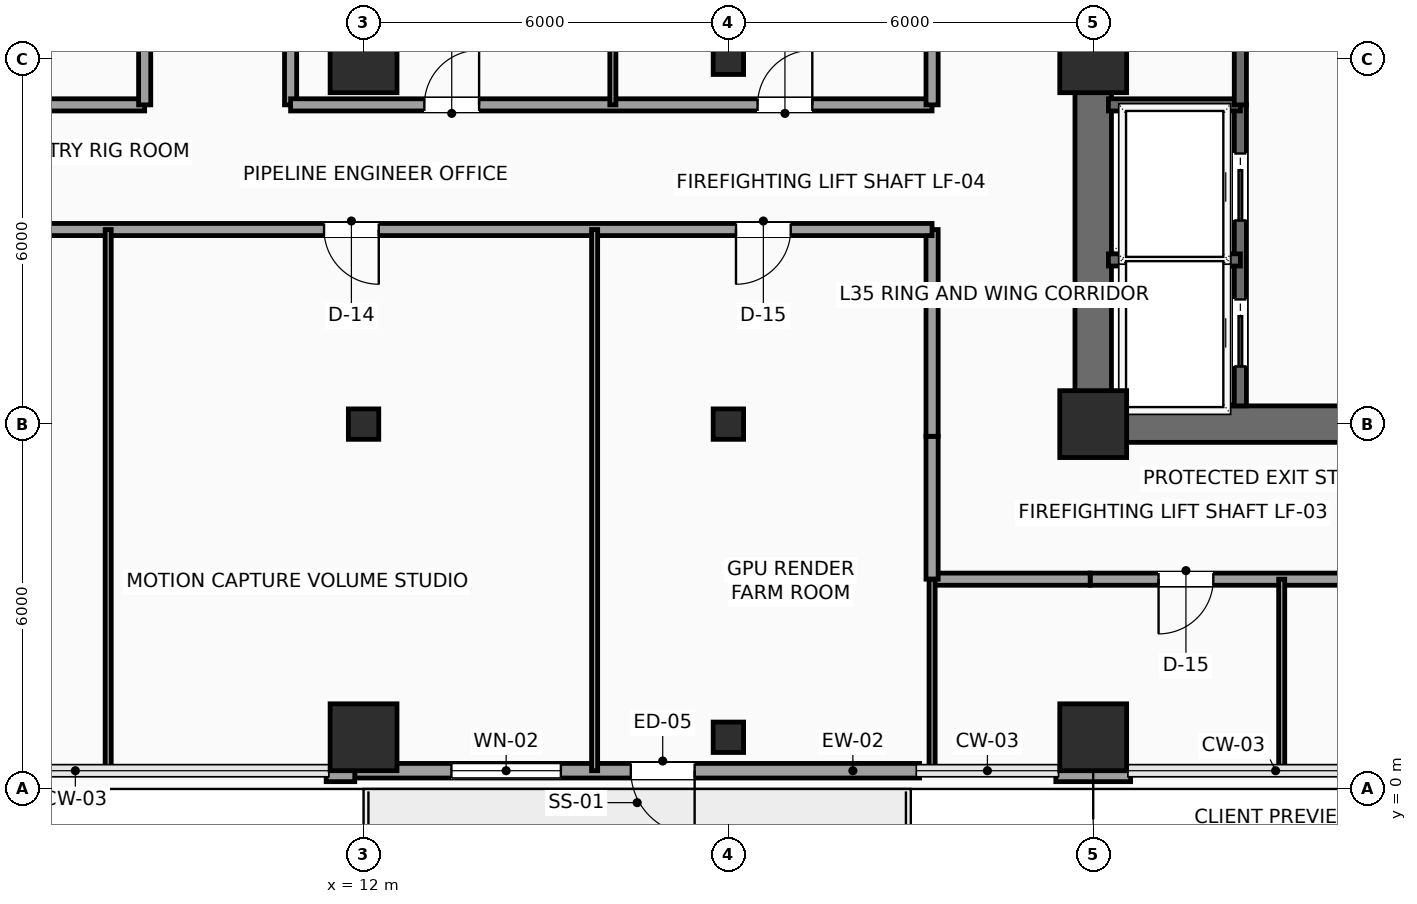
"""IFC4 building model, lengths in metres.
Left out: names, types, materials, properties, quantities, classifications, styles, units other than length and angle.
Written with IfcOpenShell. Run it as: python <this file> out.ifc"""

import sys

from ifc_helpers import new_model, si_unit, direction, frame, frame_2d, origin, origin_2d, place, context, subcontext, project, spatial, rectangle, hollow_rectangle, extrude, element, fill, save


model = new_model("IFC4")
c1 = context("Model", 3, precision=1e-05, world=origin(), true_north=direction((0.0, 1.0)))
c2 = subcontext(c1, "Body", "Model", "MODEL_VIEW")
j1 = project(units=[si_unit("LENGTHUNIT", "METRE"), si_unit("PLANEANGLEUNIT", "RADIAN")], contexts=[c1])
p1 = place(None, origin())
s1 = spatial("IfcSite", under=j1, at=p1, CompositionType="ELEMENT")
p2 = place(p1, origin())
s2 = spatial("IfcBuilding", under=s1, at=p2, CompositionType="ELEMENT")
p3 = place(p2, frame((0.0, 0.0, 145.65)))
s3 = spatial("IfcBuildingStorey", under=s2, at=p3, CompositionType="ELEMENT", Elevation=145.65)
for number, where, z_axis, x_axis in (
    (1, (24.0, 6.0, 0.0), (0.0, 0.0, 1.0), (1.0, 0.0, 0.0)),
    (2, (24.0, 12.0, 0.0), (0.0, 0.0, 1.0), (1.0, 0.0, 0.0)),
    (3, (12.0, 0.85, 0.0), (0.0, 0.0, 1.0), (1.0, 0.0, 0.0)),
):
    element("IfcColumn", number, at=place(p3, frame(where, z_axis=z_axis, x_axis=x_axis)), inside=s3, PredefinedType="COLUMN", context=c2, shape_type="SweptSolid", body=[
        extrude(rectangle(XDim=1.1, YDim=1.1, at=origin_2d()), origin(), (0.0, 0.0, 1.0), 3.75),
    ])
p4 = place(p3, frame((12.0, 6.0, 0.0), z_axis=(0.0, 0.0, 1.0), x_axis=(1.0, 0.0, 0.0)))
e4 = element("IfcColumn", 4, at=p4, inside=s3, PredefinedType="COLUMN", context=c2, shape_type="SweptSolid", body=[
    extrude(hollow_rectangle(XDim=0.5, YDim=0.5, WallThickness=0.025, InnerFilletRadius=0.025, OuterFilletRadius=0.04, at=origin_2d()), origin(), (0.0, 0.0, 1.0), 3.75),
])
p5 = place(p3, frame((12.0, 12.0, 0.0), z_axis=(0.0, 0.0, 1.0), x_axis=(1.0, 0.0, 0.0)))
e5 = element("IfcColumn", 5, at=p5, inside=s3, PredefinedType="COLUMN", context=c2, shape_type="SweptSolid", body=[
    extrude(rectangle(XDim=1.1, YDim=1.1, at=origin_2d()), origin(), (0.0, 0.0, 1.0), 3.75),
])
for number, where, z_axis, x_axis in (
    (6, (18.0, 0.85, 0.0), (0.0, 0.0, 1.0), (1.0, 0.0, 0.0)),
    (7, (18.0, 6.0, 0.0), (0.0, 0.0, 1.0), (1.0, 0.0, 0.0)),
    (8, (18.0, 12.0, 0.0), (0.0, 0.0, 1.0), (1.0, 0.0, 0.0)),
):
    element("IfcColumn", number, at=place(p3, frame(where, z_axis=z_axis, x_axis=x_axis)), inside=s3, PredefinedType="COLUMN", context=c2, shape_type="SweptSolid", body=[
        extrude(hollow_rectangle(XDim=0.5, YDim=0.5, WallThickness=0.025, InnerFilletRadius=0.025, OuterFilletRadius=0.04, at=origin_2d()), origin(), (0.0, 0.0, 1.0), 3.75),
    ])
p6 = place(p3, frame((24.0, 0.85, 0.0), z_axis=(0.0, 0.0, 1.0), x_axis=(1.0, 0.0, 0.0)))
e9 = element("IfcColumn", 9, at=p6, inside=s3, PredefinedType="COLUMN", context=c2, shape_type="SweptSolid", body=[
    extrude(rectangle(XDim=1.1, YDim=1.1, at=origin_2d()), origin(), (0.0, 0.0, 1.0), 3.75),
])
p7 = place(p3, frame((21.145, 0.3, 0.0), z_axis=(0.0, 0.0, 1.0), x_axis=(-1.0, 0.0, 0.0)))
e10 = element("IfcWall", 10, at=p7, inside=s3, PredefinedType="SOLIDWALL", context=c2, shape_type="SweptSolid", body=[
    extrude(rectangle(XDim=9.29, YDim=0.24, at=frame_2d((4.645, 0.0))), origin(), (0.0, 0.0, 1.0), 3.525),
])
p8 = place(p7, frame((3.7, 0.0, 0.0)))
e11 = element("IfcOpeningElement", 11, at=p8, cuts=e10, PredefinedType="OPENING", context=c2, shape_type="SweptSolid", body=[
    extrude(rectangle(XDim=1.05, YDim=2.2, at=frame_2d((0.525, 1.1))), frame((0.0, 0.13, 0.0), z_axis=(0.0, -1.0, 0.0), x_axis=(1.0, 0.0, 0.0)), (0.0, 0.0, 1.0), 0.26),
])
p9 = place(p7, frame((5.9, 0.0, 0.85)))
e12 = element("IfcOpeningElement", 12, at=p9, cuts=e10, PredefinedType="OPENING", context=c2, shape_type="SweptSolid", body=[
    extrude(rectangle(XDim=1.8, YDim=2.1, at=frame_2d((0.9, 1.05))), frame((0.0, 0.13, 0.0), z_axis=(0.0, -1.0, 0.0), x_axis=(1.0, 0.0, 0.0)), (0.0, 0.0, 1.0), 0.26),
])
p10 = place(p3, frame((24.615, 0.24, 0.0), z_axis=(0.0, 0.0, 1.0), x_axis=(-1.0, 0.0, 0.0)))
e13 = element("IfcWall", 13, at=p10, inside=s3, PredefinedType="SOLIDWALL", context=c2, shape_type="SweptSolid", body=[
    extrude(rectangle(XDim=1.23, YDim=0.24, at=frame_2d((0.615, 0.0))), origin(), (0.0, 0.0, 1.0), 3.525),
])
p11 = place(p3, frame((11.855, 0.24, 0.0), z_axis=(0.0, 0.0, 1.0), x_axis=(-1.0, 0.0, 0.0)))
e14 = element("IfcWall", 14, at=p11, inside=s3, PredefinedType="SOLIDWALL", context=c2, shape_type="SweptSolid", body=[
    extrude(rectangle(XDim=0.47, YDim=0.24, at=frame_2d((0.235, 0.0))), origin(), (0.0, 0.0, 1.0), 3.525),
])
p12 = place(p3, frame((24.0, 6.0, 0.0), z_axis=(0.0, 0.0, 1.0), x_axis=(1.0, 0.0, 0.0)))
e15 = element("IfcWall", 15, at=p12, inside=s3, PredefinedType="SHEAR", context=c2, shape_type="SweptSolid", body=[
    extrude(rectangle(XDim=9.6, YDim=0.6, at=frame_2d((4.8, 0.0))), origin(), (0.0, 0.0, 1.0), 3.525),
])
p13 = place(p3, frame((24.0, 6.0, 0.0), z_axis=(0.0, 0.0, 1.0), x_axis=(0.0, 1.0, 0.0)))
e16 = element("IfcWall", 16, at=p13, inside=s3, PredefinedType="SHEAR", context=c2, shape_type="SweptSolid", body=[
    extrude(rectangle(XDim=12.0, YDim=0.6, at=frame_2d((6.0, 0.0))), origin(), (0.0, 0.0, 1.0), 3.525),
])
p14 = place(p13, frame((7.15, 0.0, 0.0)))
e17 = element("IfcOpeningElement", 17, at=p14, cuts=e16, PredefinedType="OPENING", context=c2, shape_type="SweptSolid", body=[
    extrude(rectangle(XDim=1.6, YDim=2.3, at=frame_2d((0.8, 1.15))), frame((0.0, 0.31, 0.0), z_axis=(0.0, -1.0, 0.0), x_axis=(1.0, 0.0, 0.0)), (0.0, 0.0, 1.0), 0.62),
])
p15 = place(p3, frame((26.42, 6.3, 0.0), z_axis=(0.0, 0.0, 1.0), x_axis=(0.0, 1.0, 0.0)))
e18 = element("IfcWall", 18, at=p15, inside=s3, PredefinedType="SHEAR", context=c2, shape_type="SweptSolid", body=[
    extrude(rectangle(XDim=4.95, YDim=0.2, at=frame_2d((2.475, 0.0))), origin(), (0.0, 0.0, 1.0), 3.525),
])
p16 = place(p15, frame((0.65, 0.0, 0.0)))
e19 = element("IfcOpeningElement", 19, at=p16, cuts=e18, PredefinedType="OPENING", context=c2, shape_type="SweptSolid", body=[
    extrude(rectangle(XDim=1.1, YDim=2.2, at=frame_2d((0.55, 1.1))), frame((0.0, 0.11, 0.0), z_axis=(0.0, -1.0, 0.0), x_axis=(1.0, 0.0, 0.0)), (0.0, 0.0, 1.0), 0.22),
])
p17 = place(p15, frame((3.05, 0.0, 0.0)))
e20 = element("IfcOpeningElement", 20, at=p17, cuts=e18, PredefinedType="OPENING", context=c2, shape_type="SweptSolid", body=[
    extrude(rectangle(XDim=1.1, YDim=2.2, at=frame_2d((0.55, 1.1))), frame((0.0, 0.11, 0.0), z_axis=(0.0, -1.0, 0.0), x_axis=(1.0, 0.0, 0.0)), (0.0, 0.0, 1.0), 0.22),
])
for number, where, z_axis, x_axis in (
    (21, (24.25, 8.7, 0.0), (0.0, 0.0, 1.0), (1.0, 0.0, 0.0)),
    (22, (24.25, 11.25, 0.0), (0.0, 0.0, 1.0), (1.0, 0.0, 0.0)),
):
    element("IfcWall", number, at=place(p3, frame(where, z_axis=z_axis, x_axis=x_axis)), inside=s3, PredefinedType="SHEAR", context=c2, shape_type="SweptSolid", body=[
        extrude(rectangle(XDim=2.17, YDim=0.2, at=frame_2d((1.085, 0.0))), origin(), (0.0, 0.0, 1.0), 3.525),
    ])
p18 = place(p3, frame((26.42, 11.25, 0.0), z_axis=(0.0, 0.0, 1.0), x_axis=(0.0, 1.0, 0.0)))
e23 = element("IfcWall", 23, at=p18, inside=s3, PredefinedType="SHEAR", context=c2, shape_type="SweptSolid", body=[
    extrude(rectangle(XDim=1.4, YDim=0.2, at=frame_2d((0.7, 0.0))), origin(), (0.0, 0.0, 1.0), 3.525),
])
p19 = place(p3, frame((36.15, 3.45, 0.0), z_axis=(0.0, 0.0, 1.0), x_axis=(-1.0, 0.0, 0.0)))
e24 = element("IfcWall", 24, at=p19, inside=s3, PredefinedType="PARTITIONING", context=c2, shape_type="SweptSolid", body=[
    extrude(rectangle(XDim=12.2, YDim=0.2, at=frame_2d((6.1, 0.0))), origin(), (0.0, 0.0, 1.0), 3.067),
])
p20 = place(p19, frame((10.175, 0.0, 0.0)))
e25 = element("IfcOpeningElement", 25, at=p20, cuts=e24, PredefinedType="OPENING", context=c2, shape_type="SweptSolid", body=[
    extrude(rectangle(XDim=0.9, YDim=2.1, at=frame_2d((0.45, 1.05))), frame((0.0, 0.11, 0.0), z_axis=(0.0, -1.0, 0.0), x_axis=(1.0, 0.0, 0.0)), (0.0, 0.0, 1.0), 0.22),
])
p21 = place(p19, frame((5.75, 0.0, 0.0)))
e26 = element("IfcOpeningElement", 26, at=p21, cuts=e24, PredefinedType="OPENING", context=c2, shape_type="SweptSolid", body=[
    extrude(rectangle(XDim=0.9, YDim=2.1, at=frame_2d((0.45, 1.05))), frame((0.0, 0.11, 0.0), z_axis=(0.0, -1.0, 0.0), x_axis=(1.0, 0.0, 0.0)), (0.0, 0.0, 1.0), 0.22),
])
p22 = place(p3, frame((23.95, 3.45, 0.0), z_axis=(0.0, 0.0, 1.0), x_axis=(-1.0, 0.0, 0.0)))
e27 = element("IfcWall", 27, at=p22, inside=s3, PredefinedType="PARTITIONING", context=c2, shape_type="SweptSolid", body=[
    extrude(rectangle(XDim=2.6, YDim=0.2, at=frame_2d((1.3, 0.0))), origin(), (0.0, 0.0, 1.0), 3.067),
])
p23 = place(p3, frame((21.35, 3.45, 0.0), z_axis=(0.0, 0.0, 1.0), x_axis=(0.0, 1.0, 0.0)))
e28 = element("IfcWall", 28, at=p23, inside=s3, PredefinedType="PARTITIONING", context=c2, shape_type="SweptSolid", body=[
    extrude(rectangle(XDim=2.35, YDim=0.2, at=frame_2d((1.175, 0.0))), origin(), (0.0, 0.0, 1.0), 3.525),
])
p24 = place(p3, frame((21.35, 5.8, 0.0), z_axis=(0.0, 0.0, 1.0), x_axis=(0.0, 1.0, 0.0)))
e29 = element("IfcWall", 29, at=p24, inside=s3, PredefinedType="PARTITIONING", context=c2, shape_type="SweptSolid", body=[
    extrude(rectangle(XDim=3.4, YDim=0.2, at=frame_2d((1.7, 0.0))), origin(), (0.0, 0.0, 1.0), 3.525),
])
p25 = place(p3, frame((21.35, 9.2, 0.0), z_axis=(0.0, 0.0, 1.0), x_axis=(-1.0, 0.0, 0.0)))
e30 = element("IfcWall", 30, at=p25, inside=s3, PredefinedType="PARTITIONING", context=c2, shape_type="SweptSolid", body=[
    extrude(rectangle(XDim=18.15, YDim=0.2, at=frame_2d((9.075, 0.0))), origin(), (0.0, 0.0, 1.0), 3.067),
])
p26 = place(p25, frame((15.4, 0.0, 0.0)))
e31 = element("IfcOpeningElement", 31, at=p26, cuts=e30, PredefinedType="OPENING", context=c2, shape_type="SweptSolid", body=[
    extrude(rectangle(XDim=0.9, YDim=2.1, at=frame_2d((0.45, 1.05))), frame((0.0, 0.11, 0.0), z_axis=(0.0, -1.0, 0.0), x_axis=(1.0, 0.0, 0.0)), (0.0, 0.0, 1.0), 0.22),
])
p27 = place(p25, frame((9.1, 0.0, 0.0)))
e32 = element("IfcOpeningElement", 32, at=p27, cuts=e30, PredefinedType="OPENING", context=c2, shape_type="SweptSolid", body=[
    extrude(rectangle(XDim=0.9, YDim=2.1, at=frame_2d((0.45, 1.05))), frame((0.0, 0.11, 0.0), z_axis=(0.0, -1.0, 0.0), x_axis=(1.0, 0.0, 0.0)), (0.0, 0.0, 1.0), 0.22),
])
p28 = place(p25, frame((2.325, 0.0, 0.0)))
e33 = element("IfcOpeningElement", 33, at=p28, cuts=e30, PredefinedType="OPENING", context=c2, shape_type="SweptSolid", body=[
    extrude(rectangle(XDim=0.9, YDim=2.1, at=frame_2d((0.45, 1.05))), frame((0.0, 0.11, 0.0), z_axis=(0.0, -1.0, 0.0), x_axis=(1.0, 0.0, 0.0)), (0.0, 0.0, 1.0), 0.22),
])
p29 = place(p3, frame((3.2, 11.25, 0.0), z_axis=(0.0, 0.0, 1.0), x_axis=(1.0, 0.0, 0.0)))
e34 = element("IfcWall", 34, at=p29, inside=s3, PredefinedType="PARTITIONING", context=c2, shape_type="SweptSolid", body=[
    extrude(rectangle(XDim=5.2, YDim=0.2, at=frame_2d((2.6, 0.0))), origin(), (0.0, 0.0, 1.0), 3.525),
])
for number, where, z_axis, x_axis in (
    (35, (8.4, 11.25, 0.0), (0.0, 0.0, 1.0), (0.0, 1.0, 0.0)),
    (36, (10.8, 15.55, 0.0), (0.0, 0.0, 1.0), (0.0, -1.0, 0.0)),
):
    element("IfcWall", number, at=place(p3, frame(where, z_axis=z_axis, x_axis=x_axis)), inside=s3, PredefinedType="PARTITIONING", context=c2, shape_type="SweptSolid", body=[
        extrude(rectangle(XDim=4.3, YDim=0.2, at=frame_2d((2.15, 0.0))), origin(), (0.0, 0.0, 1.0), 3.525),
    ])
p30 = place(p3, frame((10.8, 11.25, 0.0), z_axis=(0.0, 0.0, 1.0), x_axis=(1.0, 0.0, 0.0)))
e37 = element("IfcWall", 37, at=p30, inside=s3, PredefinedType="PARTITIONING", context=c2, shape_type="SweptSolid", body=[
    extrude(rectangle(XDim=10.55, YDim=0.2, at=frame_2d((5.275, 0.0))), origin(), (0.0, 0.0, 1.0), 3.525),
])
p31 = place(p30, frame((2.2, 0.0, 0.0)))
e38 = element("IfcOpeningElement", 38, at=p31, cuts=e37, PredefinedType="OPENING", context=c2, shape_type="SweptSolid", body=[
    extrude(rectangle(XDim=0.9, YDim=2.1, at=frame_2d((0.45, 1.05))), frame((0.0, 0.11, 0.0), z_axis=(0.0, -1.0, 0.0), x_axis=(1.0, 0.0, 0.0)), (0.0, 0.0, 1.0), 0.22),
])
p32 = place(p30, frame((7.68, 0.0, 0.0)))
e39 = element("IfcOpeningElement", 39, at=p32, cuts=e37, PredefinedType="OPENING", context=c2, shape_type="SweptSolid", body=[
    extrude(rectangle(XDim=0.9, YDim=2.1, at=frame_2d((0.45, 1.05))), frame((0.0, 0.11, 0.0), z_axis=(0.0, -1.0, 0.0), x_axis=(1.0, 0.0, 0.0)), (0.0, 0.0, 1.0), 0.22),
])
p33 = place(p3, frame((21.35, 11.25, 0.0), z_axis=(0.0, 0.0, 1.0), x_axis=(0.0, 1.0, 0.0)))
e40 = element("IfcWall", 40, at=p33, inside=s3, PredefinedType="PARTITIONING", context=c2, shape_type="SweptSolid", body=[
    extrude(rectangle(XDim=19.0, YDim=0.2, at=frame_2d((9.5, 0.0))), origin(), (0.0, 0.0, 1.0), 3.525),
])
p34 = place(p33, frame((8.7, 0.0, 0.0)))
e41 = element("IfcOpeningElement", 41, at=p34, cuts=e40, PredefinedType="OPENING", context=c2, shape_type="SweptSolid", body=[
    extrude(rectangle(XDim=0.95, YDim=2.15, at=frame_2d((0.475, 1.075))), frame((0.0, 0.11, 0.0), z_axis=(0.0, -1.0, 0.0), x_axis=(1.0, 0.0, 0.0)), (0.0, 0.0, 1.0), 0.22),
])
p35 = place(p33, frame((13.475, 0.0, 0.0)))
e42 = element("IfcOpeningElement", 42, at=p35, cuts=e40, PredefinedType="OPENING", context=c2, shape_type="SweptSolid", body=[
    extrude(rectangle(XDim=0.9, YDim=2.1, at=frame_2d((0.45, 1.05))), frame((0.0, 0.11, 0.0), z_axis=(0.0, -1.0, 0.0), x_axis=(1.0, 0.0, 0.0)), (0.0, 0.0, 1.0), 0.22),
])
p36 = place(p33, frame((5.05, 0.0, 0.0)))
e43 = element("IfcOpeningElement", 43, at=p36, cuts=e40, PredefinedType="OPENING", context=c2, shape_type="SweptSolid", body=[
    extrude(rectangle(XDim=0.9, YDim=2.1, at=frame_2d((0.45, 1.05))), frame((0.0, 0.11, 0.0), z_axis=(0.0, -1.0, 0.0), x_axis=(1.0, 0.0, 0.0)), (0.0, 0.0, 1.0), 0.22),
])
p37 = place(p3, frame((16.1, 11.25, 0.0), z_axis=(0.0, 0.0, 1.0), x_axis=(0.0, 1.0, 0.0)))
e44 = element("IfcWall", 44, at=p37, inside=s3, PredefinedType="PARTITIONING", context=c2, shape_type="SweptSolid", body=[
    extrude(rectangle(XDim=4.3, YDim=0.1, at=frame_2d((2.15, 0.0))), origin(), (0.0, 0.0, 1.0), 3.525),
])
for number, where, z_axis, x_axis in (
    (45, (21.35, 0.3, 0.0), (0.0, 0.0, 1.0), (0.0, 1.0, 0.0)),
    (46, (27.1, 0.3, 0.0), (0.0, 0.0, 1.0), (0.0, 1.0, 0.0)),
):
    element("IfcWall", number, at=place(p3, frame(where, z_axis=z_axis, x_axis=x_axis)), inside=s3, PredefinedType="PARTITIONING", context=c2, shape_type="SweptSolid", body=[
        extrude(rectangle(XDim=3.15, YDim=0.1, at=frame_2d((1.575, 0.0))), origin(), (0.0, 0.0, 1.0), 3.525),
    ])
p38 = place(p3, frame((0.35, 0.35, 0.0), z_axis=(0.0, 0.0, 1.0), x_axis=(0.999977434951, -0.006717855945, 0.0)))
e47 = element("IfcWall", 47, at=p38, inside=s3, PredefinedType="PARTITIONING", context=c2, shape_type="SweptSolid", body=[
    extrude(rectangle(XDim=7.45, YDim=0.1, at=frame_2d((3.725, 0.0))), origin(), (0.0, 0.0, 1.0), 3.525),
])
for number, where, z_axis, x_axis in (
    (48, (7.8, 0.3, 0.0), (0.0, 0.0, 1.0), (0.0, 1.0, 0.0)),
    (49, (15.8, 0.3, 0.0), (0.0, 0.0, 1.0), (0.0, 1.0, 0.0)),
):
    element("IfcWall", number, at=place(p3, frame(where, z_axis=z_axis, x_axis=x_axis)), inside=s3, PredefinedType="PARTITIONING", context=c2, shape_type="SweptSolid", body=[
        extrude(rectangle(XDim=8.9, YDim=0.1, at=frame_2d((4.45, 0.0))), origin(), (0.0, 0.0, 1.0), 3.525),
    ])
p39 = place(p8, origin())
e50 = element("IfcDoor", 50, at=p39, inside=s3, OperationType="SINGLE_SWING_LEFT", PredefinedType="DOOR", context=c2, shape_type="SweptSolid", body=[
    extrude(rectangle(XDim=1.05, YDim=2.2, at=frame_2d((0.525, 1.1))), frame((0.0, 0.025, 0.0), z_axis=(0.0, -1.0, 0.0), x_axis=(1.0, 0.0, 0.0)), (0.0, 0.0, 1.0), 0.05),
])
fill(e11, e50)
p40 = place(p9, origin())
e51 = element("IfcWindow", 51, at=p40, inside=s3, PartitioningType="SINGLE_PANEL", PredefinedType="WINDOW", context=c2, shape_type="SweptSolid", body=[
    extrude(rectangle(XDim=1.8, YDim=2.1, at=frame_2d((0.9, 1.05))), frame((0.0, 0.03, 0.0), z_axis=(0.0, -1.0, 0.0), x_axis=(1.0, 0.0, 0.0)), (0.0, 0.0, 1.0), 0.06),
])
fill(e12, e51)
p41 = place(p16, origin())
e52 = element("IfcDoor", 52, at=p41, inside=s3, OperationType="SLIDING_TO_LEFT", PredefinedType="DOOR", context=c2, shape_type="SweptSolid", body=[
    extrude(rectangle(XDim=1.1, YDim=2.2, at=frame_2d((0.55, 1.1))), frame((0.0, 0.025, 0.0), z_axis=(0.0, -1.0, 0.0), x_axis=(1.0, 0.0, 0.0)), (0.0, 0.0, 1.0), 0.05),
])
fill(e19, e52)
p42 = place(p17, origin())
e53 = element("IfcDoor", 53, at=p42, inside=s3, OperationType="SLIDING_TO_LEFT", PredefinedType="DOOR", context=c2, shape_type="SweptSolid", body=[
    extrude(rectangle(XDim=1.1, YDim=2.2, at=frame_2d((0.55, 1.1))), frame((0.0, 0.025, 0.0), z_axis=(0.0, -1.0, 0.0), x_axis=(1.0, 0.0, 0.0)), (0.0, 0.0, 1.0), 0.05),
])
fill(e20, e53)
p43 = place(p20, origin())
e54 = element("IfcDoor", 54, at=p43, inside=s3, OperationType="SINGLE_SWING_RIGHT", PredefinedType="DOOR", context=c2, shape_type="SweptSolid", body=[
    extrude(rectangle(XDim=0.9, YDim=2.1, at=frame_2d((0.45, 1.05))), frame((0.0, 0.025, 0.0), z_axis=(0.0, -1.0, 0.0), x_axis=(1.0, 0.0, 0.0)), (0.0, 0.0, 1.0), 0.05),
])
fill(e25, e54)
p44 = place(p27, origin())
e55 = element("IfcDoor", 55, at=p44, inside=s3, OperationType="SINGLE_SWING_LEFT", PredefinedType="DOOR", context=c2, shape_type="SweptSolid", body=[
    extrude(rectangle(XDim=0.9, YDim=2.1, at=frame_2d((0.45, 1.05))), frame((0.0, 0.025, 0.0), z_axis=(0.0, -1.0, 0.0), x_axis=(1.0, 0.0, 0.0)), (0.0, 0.0, 1.0), 0.05),
])
fill(e32, e55)
p45 = place(p28, origin())
e56 = element("IfcDoor", 56, at=p45, inside=s3, OperationType="SINGLE_SWING_RIGHT", PredefinedType="DOOR", context=c2, shape_type="SweptSolid", body=[
    extrude(rectangle(XDim=0.9, YDim=2.1, at=frame_2d((0.45, 1.05))), frame((0.0, 0.025, 0.0), z_axis=(0.0, -1.0, 0.0), x_axis=(1.0, 0.0, 0.0)), (0.0, 0.0, 1.0), 0.05),
])
fill(e33, e56)
p46 = place(p31, origin())
e57 = element("IfcDoor", 57, at=p46, inside=s3, OperationType="SINGLE_SWING_RIGHT", PredefinedType="DOOR", context=c2, shape_type="SweptSolid", body=[
    extrude(rectangle(XDim=0.9, YDim=2.1, at=frame_2d((0.45, 1.05))), frame((0.0, 0.025, 0.0), z_axis=(0.0, -1.0, 0.0), x_axis=(1.0, 0.0, 0.0)), (0.0, 0.0, 1.0), 0.05),
])
fill(e38, e57)
p47 = place(p32, origin())
e58 = element("IfcDoor", 58, at=p47, inside=s3, OperationType="SINGLE_SWING_RIGHT", PredefinedType="DOOR", context=c2, shape_type="SweptSolid", body=[
    extrude(rectangle(XDim=0.9, YDim=2.1, at=frame_2d((0.45, 1.05))), frame((0.0, 0.025, 0.0), z_axis=(0.0, -1.0, 0.0), x_axis=(1.0, 0.0, 0.0)), (0.0, 0.0, 1.0), 0.05),
])
fill(e39, e58)
save(model, sys.argv[1])
